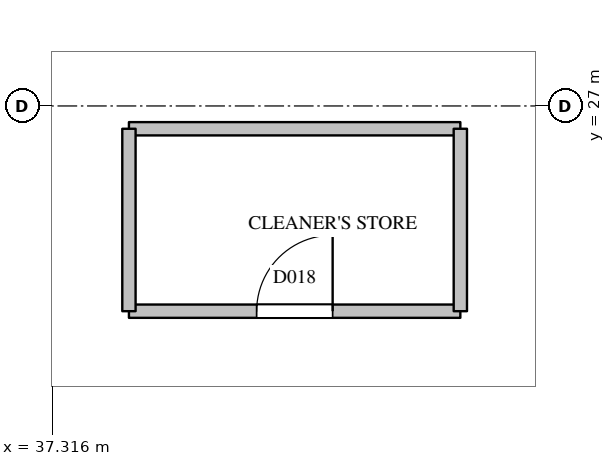
"""IFC4 building model, lengths in metres.
Left out: names, types, materials, properties, quantities, classifications, styles, units other than length and angle.
Written with IfcOpenShell. Run it as: python <this file> out.ifc"""

import sys

from ifc_helpers import new_model, si_unit, direction, frame, frame_2d, origin, place, context, subcontext, project, spatial, rectangle, extrude, element, fill, save


model = new_model("IFC4")
c1 = context("Model", 3, precision=1e-05, world=origin(), true_north=direction((0.0, 1.0)))
c2 = subcontext(c1, "Body", "Model", "MODEL_VIEW")
j1 = project(units=[si_unit("LENGTHUNIT", "METRE"), si_unit("PLANEANGLEUNIT", "RADIAN")], contexts=[c1])
p1 = place(None, origin())
s1 = spatial("IfcSite", under=j1, at=p1, CompositionType="ELEMENT")
p2 = place(p1, origin())
s2 = spatial("IfcBuilding", under=s1, at=p2, CompositionType="ELEMENT")
p3 = place(p2, frame((0.0, 0.0, 96.8)))
s3 = spatial("IfcBuildingStorey", under=s2, at=p3, CompositionType="ELEMENT", Elevation=96.8)
p4 = place(p3, frame((38.32, 24.3, 0.0), z_axis=(0.0, 0.0, 1.0), x_axis=(1.0, 0.0, 0.0)))
e1 = element("IfcWall", 1, at=p4, inside=s3, PredefinedType="PARTITIONING", context=c2, shape_type="SweptSolid", body=[
    extrude(rectangle(XDim=4.36, YDim=0.175, at=frame_2d((2.18, 0.0))), origin(), (0.0, 0.0, 1.0), 3.5),
])
p5 = place(p4, frame((1.68, 0.0, 0.0)))
e2 = element("IfcOpeningElement", 2, at=p5, cuts=e1, PredefinedType="OPENING", context=c2, shape_type="SweptSolid", body=[
    extrude(rectangle(XDim=1.0, YDim=2.1, at=frame_2d((0.5, 1.05))), frame((0.0, 0.097, 0.0), z_axis=(0.0, -1.0, 0.0), x_axis=(1.0, 0.0, 0.0)), (0.0, 0.0, 1.0), 0.195),
])
p6 = place(p3, frame((38.32, 26.7, 0.0), z_axis=(0.0, 0.0, 1.0), x_axis=(1.0, 0.0, 0.0)))
e3 = element("IfcWall", 3, at=p6, inside=s3, PredefinedType="PARTITIONING", context=c2, shape_type="SweptSolid", body=[
    extrude(rectangle(XDim=4.36, YDim=0.175, at=frame_2d((2.18, 0.0))), origin(), (0.0, 0.0, 1.0), 2.5),
])
for number, where, z_axis, x_axis in (
    (4, (38.32, 24.3, 0.0), (0.0, 0.0, 1.0), (0.0, 1.0, 0.0)),
    (5, (42.68, 24.3, 0.0), (0.0, 0.0, 1.0), (0.0, 1.0, 0.0)),
):
    element("IfcWall", number, at=place(p3, frame(where, z_axis=z_axis, x_axis=x_axis)), inside=s3, PredefinedType="PARTITIONING", context=c2, shape_type="SweptSolid", body=[
        extrude(rectangle(XDim=2.4, YDim=0.175, at=frame_2d((1.2, 0.0))), origin(), (0.0, 0.0, 1.0), 2.5),
    ])
p7 = place(p5, origin())
e6 = element("IfcDoor", 6, at=p7, inside=s3, OperationType="SINGLE_SWING_RIGHT", PredefinedType="DOOR", context=c2, shape_type="SweptSolid", body=[
    extrude(rectangle(XDim=1.0, YDim=2.1, at=frame_2d((0.5, 1.05))), frame((0.0, 0.025, 0.0), z_axis=(0.0, -1.0, 0.0), x_axis=(1.0, 0.0, 0.0)), (0.0, 0.0, 1.0), 0.05),
])
fill(e2, e6)
save(model, sys.argv[1])
